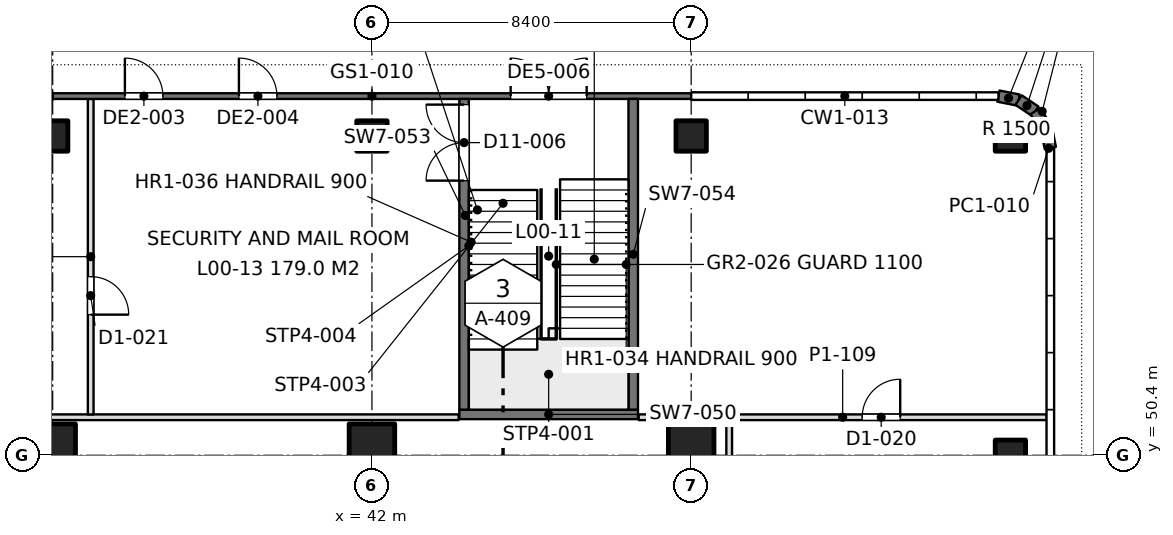
"""IFC4 building model, lengths in metres.
Left out: names, types, materials, properties, quantities, classifications, styles, units other than length and angle.
Written with IfcOpenShell. Run it as: python <this file> out.ifc"""

import sys

from ifc_helpers import new_model, si_unit, direction, frame, frame_2d, origin, origin_2d, place, context, subcontext, project, spatial, rectangle, extrude, element, fill, save


model = new_model("IFC4")
c1 = context("Model", 3, precision=1e-05, world=origin(), true_north=direction((0.0, 1.0)))
c2 = subcontext(c1, "Body", "Model", "MODEL_VIEW")
j1 = project(units=[si_unit("LENGTHUNIT", "METRE"), si_unit("PLANEANGLEUNIT", "RADIAN")], contexts=[c1])
p1 = place(None, origin())
s1 = spatial("IfcSite", under=j1, at=p1, CompositionType="ELEMENT")
p2 = place(p1, origin())
s2 = spatial("IfcBuilding", under=s1, at=p2, CompositionType="ELEMENT")
p3 = place(p2, origin())
s3 = spatial("IfcBuildingStorey", under=s2, at=p3, CompositionType="ELEMENT", Elevation=0.0)
p4 = place(p3, frame((33.6, 50.4, 0.0), z_axis=(0.0, 0.0, 1.0), x_axis=(1.0, 0.0, 0.0)))
e1 = element("IfcColumn", 1, at=p4, inside=s3, PredefinedType="COLUMN", context=c2, shape_type="SweptSolid", body=[
    extrude(rectangle(XDim=1.2, YDim=1.65, at=origin_2d()), origin(), (0.0, 0.0, 1.0), 5.4),
])
p5 = place(p3, frame((33.6, 58.8, 0.0), z_axis=(0.0, 0.0, 1.0), x_axis=(1.0, 0.0, 0.0)))
e2 = element("IfcColumn", 2, at=p5, inside=s3, PredefinedType="COLUMN", context=c2, shape_type="SweptSolid", body=[
    extrude(rectangle(XDim=0.8, YDim=0.8, at=origin_2d()), origin(), (0.0, 0.0, 1.0), 5.4),
])
p6 = place(p3, frame((42.0, 50.4, 0.0), z_axis=(0.0, 0.0, 1.0), x_axis=(1.0, 0.0, 0.0)))
e3 = element("IfcColumn", 3, at=p6, inside=s3, PredefinedType="COLUMN", context=c2, shape_type="SweptSolid", body=[
    extrude(rectangle(XDim=1.2, YDim=1.65, at=origin_2d()), origin(), (0.0, 0.0, 1.0), 5.4),
])
p7 = place(p3, frame((42.0, 58.8, 0.0), z_axis=(0.0, 0.0, 1.0), x_axis=(1.0, 0.0, 0.0)))
e4 = element("IfcColumn", 4, at=p7, inside=s3, PredefinedType="COLUMN", context=c2, shape_type="SweptSolid", body=[
    extrude(rectangle(XDim=0.8, YDim=0.8, at=origin_2d()), origin(), (0.0, 0.0, 1.0), 5.4),
])
p8 = place(p3, frame((50.4, 50.4, 0.0), z_axis=(0.0, 0.0, 1.0), x_axis=(1.0, 0.0, 0.0)))
e5 = element("IfcColumn", 5, at=p8, inside=s3, PredefinedType="COLUMN", context=c2, shape_type="SweptSolid", body=[
    extrude(rectangle(XDim=1.2, YDim=1.65, at=origin_2d()), origin(), (0.0, 0.0, 1.0), 5.4),
])
for number, where, z_axis, x_axis in (
    (6, (50.4, 58.8, 0.0), (0.0, 0.0, 1.0), (1.0, 0.0, 0.0)),
    (7, (58.8, 50.4, 0.0), (0.0, 0.0, 1.0), (1.0, 0.0, 0.0)),
    (8, (58.8, 58.8, 0.0), (0.0, 0.0, 1.0), (1.0, 0.0, 0.0)),
):
    element("IfcColumn", number, at=place(p3, frame(where, z_axis=z_axis, x_axis=x_axis)), inside=s3, PredefinedType="COLUMN", context=c2, shape_type="SweptSolid", body=[
        extrude(rectangle(XDim=0.8, YDim=0.8, at=origin_2d()), origin(), (0.0, 0.0, 1.0), 5.4),
    ])
p9 = place(p3, frame((33.6, 59.85, 0.0), z_axis=(0.0, 0.0, 1.0), x_axis=(1.0, 0.0, 0.0)))
e9 = element("IfcWall", 9, at=p9, inside=s3, PredefinedType="SOLIDWALL", context=c2, shape_type="SweptSolid", body=[
    extrude(rectangle(XDim=16.8, YDim=0.15, at=frame_2d((8.4, 0.0))), origin(), (0.0, 0.0, 1.0), 5.2),
])
p10 = place(p9, frame((4.9, 0.0, 0.0)))
e10 = element("IfcOpeningElement", 10, at=p10, cuts=e9, PredefinedType="OPENING", context=c2, shape_type="SweptSolid", body=[
    extrude(rectangle(XDim=1.0, YDim=2.2, at=frame_2d((0.5, 1.1))), frame((0.0, 0.085, 0.0), z_axis=(0.0, -1.0, 0.0), x_axis=(1.0, 0.0, 0.0)), (0.0, 0.0, 1.0), 0.17),
])
p11 = place(p9, frame((1.9, 0.0, 0.0)))
e11 = element("IfcOpeningElement", 11, at=p11, cuts=e9, PredefinedType="OPENING", context=c2, shape_type="SweptSolid", body=[
    extrude(rectangle(XDim=1.0, YDim=2.2, at=frame_2d((0.5, 1.1))), frame((0.0, 0.085, 0.0), z_axis=(0.0, -1.0, 0.0), x_axis=(1.0, 0.0, 0.0)), (0.0, 0.0, 1.0), 0.17),
])
p12 = place(p9, frame((12.05, 0.0, 0.0)))
e12 = element("IfcOpeningElement", 12, at=p12, cuts=e9, PredefinedType="OPENING", context=c2, shape_type="SweptSolid", body=[
    extrude(rectangle(XDim=2.0, YDim=2.4, at=frame_2d((1.0, 1.2))), frame((0.0, 0.085, 0.0), z_axis=(0.0, -1.0, 0.0), x_axis=(1.0, 0.0, 0.0)), (0.0, 0.0, 1.0), 0.17),
])
p13 = place(p3, frame((58.485, 59.85, 0.0), z_axis=(0.0, 0.0, 1.0), x_axis=(0.980702050465, -0.1955082817, 0.0)))
e13 = element("IfcWall", 13, at=p13, inside=s3, PredefinedType="SOLIDWALL", context=c2, shape_type="SweptSolid", body=[
    extrude(rectangle(XDim=0.541, YDim=0.3, at=frame_2d((0.271, 0.0))), origin(), (0.0, 0.0, 1.0), 5.2),
])
for number, where, z_axis, x_axis in (
    (14, (59.015, 59.744, 0.0), (0.0, 0.0, 1.0), (0.832, -0.555, 0.0)),
    (15, (59.453, 59.453, 0.0), (0.0, 0.0, 1.0), (0.555, -0.832, 0.0)),
):
    element("IfcWall", number, at=place(p3, frame(where, z_axis=z_axis, x_axis=x_axis)), inside=s3, PredefinedType="SOLIDWALL", context=c2, shape_type="SweptSolid", body=[
        extrude(rectangle(XDim=0.526, YDim=0.3, at=frame_2d((0.263, 0.0))), origin(), (0.0, 0.0, 1.0), 5.2),
    ])
p14 = place(p3, frame((59.744, 59.015, 0.0), z_axis=(0.0, 0.0, 1.0), x_axis=(0.1955082817, -0.980702050465, 0.0)))
e16 = element("IfcWall", 16, at=p14, inside=s3, PredefinedType="SOLIDWALL", context=c2, shape_type="SweptSolid", body=[
    extrude(rectangle(XDim=0.541, YDim=0.3, at=frame_2d((0.271, 0.0))), origin(), (0.0, 0.0, 1.0), 5.2),
])
p15 = place(p3, frame((6.12, 51.4, 0.0), z_axis=(0.0, 0.0, 1.0), x_axis=(1.0, 0.0, 0.0)))
e17 = element("IfcWall", 17, at=p15, inside=s3, PredefinedType="PARTITIONING", context=c2, shape_type="SweptSolid", body=[
    extrude(rectangle(XDim=38.16, YDim=0.15, at=frame_2d((19.08, 0.0))), origin(), (0.0, 0.0, 1.0), 4.6),
])
p16 = place(p15, frame((13.98, 0.0, 0.0)))
e18 = element("IfcOpeningElement", 18, at=p16, cuts=e17, PredefinedType="OPENING", context=c2, shape_type="SweptSolid", body=[
    extrude(rectangle(XDim=1.8, YDim=2.2, at=frame_2d((0.9, 1.1))), frame((0.0, 0.085, 0.0), z_axis=(0.0, -1.0, 0.0), x_axis=(1.0, 0.0, 0.0)), (0.0, 0.0, 1.0), 0.17),
])
p17 = place(p15, frame((22.38, 0.0, 0.0)))
e19 = element("IfcOpeningElement", 19, at=p17, cuts=e17, PredefinedType="OPENING", context=c2, shape_type="SweptSolid", body=[
    extrude(rectangle(XDim=1.8, YDim=2.2, at=frame_2d((0.9, 1.1))), frame((0.0, 0.085, 0.0), z_axis=(0.0, -1.0, 0.0), x_axis=(1.0, 0.0, 0.0)), (0.0, 0.0, 1.0), 0.17),
])
p18 = place(p3, frame((49.02, 51.4, 0.0), z_axis=(0.0, 0.0, 1.0), x_axis=(1.0, 0.0, 0.0)))
e20 = element("IfcWall", 20, at=p18, inside=s3, PredefinedType="PARTITIONING", context=c2, shape_type="SweptSolid", body=[
    extrude(rectangle(XDim=10.732, YDim=0.15, at=frame_2d((5.366, 0.0))), origin(), (0.0, 0.0, 1.0), 4.6),
])
p19 = place(p18, frame((5.88, 0.0, 0.0)))
e21 = element("IfcOpeningElement", 21, at=p19, cuts=e20, PredefinedType="OPENING", context=c2, shape_type="SweptSolid", body=[
    extrude(rectangle(XDim=1.0, YDim=2.2, at=frame_2d((0.5, 1.1))), frame((0.0, 0.085, 0.0), z_axis=(0.0, -1.0, 0.0), x_axis=(1.0, 0.0, 0.0)), (0.0, 0.0, 1.0), 0.17),
])
p20 = place(p3, frame((51.4, 37.8, 0.0), z_axis=(0.0, 0.0, 1.0), x_axis=(0.0, 1.0, 0.0)))
e22 = element("IfcWall", 22, at=p20, inside=s3, PredefinedType="PARTITIONING", context=c2, shape_type="SweptSolid", body=[
    extrude(rectangle(XDim=13.526, YDim=0.15, at=frame_2d((6.763, 0.0))), origin(), (0.0, 0.0, 1.0), 4.6),
])
p21 = place(p20, frame((7.9, 0.0, 0.0)))
e23 = element("IfcOpeningElement", 23, at=p21, cuts=e22, PredefinedType="OPENING", context=c2, shape_type="SweptSolid", body=[
    extrude(rectangle(XDim=1.0, YDim=2.2, at=frame_2d((0.5, 1.1))), frame((0.0, 0.085, 0.0), z_axis=(0.0, -1.0, 0.0), x_axis=(1.0, 0.0, 0.0)), (0.0, 0.0, 1.0), 0.17),
])
p22 = place(p3, frame((34.6, 51.474, 0.0), z_axis=(0.0, 0.0, 1.0), x_axis=(0.0, 1.0, 0.0)))
e24 = element("IfcWall", 24, at=p22, inside=s3, PredefinedType="PARTITIONING", context=c2, shape_type="SweptSolid", body=[
    extrude(rectangle(XDim=8.302, YDim=0.15, at=frame_2d((4.151, 0.0))), origin(), (0.0, 0.0, 1.0), 4.6),
])
p23 = place(p22, frame((2.626, 0.0, 0.0)))
e25 = element("IfcOpeningElement", 25, at=p23, cuts=e24, PredefinedType="OPENING", context=c2, shape_type="SweptSolid", body=[
    extrude(rectangle(XDim=1.0, YDim=2.2, at=frame_2d((0.5, 1.1))), frame((0.0, 0.085, 0.0), z_axis=(0.0, -1.0, 0.0), x_axis=(1.0, 0.0, 0.0)), (0.0, 0.0, 1.0), 0.17),
])
p24 = place(p3, frame((44.425, 59.776, 0.0), z_axis=(0.0, 0.0, 1.0), x_axis=(0.0, -1.0, 0.0)))
e26 = element("IfcWall", 26, at=p24, inside=s3, PredefinedType="SOLIDWALL", context=c2, shape_type="SweptSolid", body=[
    extrude(rectangle(XDim=8.176, YDim=0.25, at=frame_2d((4.088, 0.0))), origin(), (0.0, 0.0, 1.0), 5.4),
])
p25 = place(p24, frame((0.15, 0.0, 0.0)))
e27 = element("IfcOpeningElement", 27, at=p25, cuts=e26, PredefinedType="OPENING", context=c2, shape_type="SweptSolid", body=[
    extrude(rectangle(XDim=2.0, YDim=2.2, at=frame_2d((1.0, 1.1))), frame((0.0, 0.135, 0.0), z_axis=(0.0, -1.0, 0.0), x_axis=(1.0, 0.0, 0.0)), (0.0, 0.0, 1.0), 0.27),
])
p26 = place(p3, frame((48.875, 59.776, 0.0), z_axis=(0.0, 0.0, 1.0), x_axis=(0.0, -1.0, 0.0)))
e28 = element("IfcWall", 28, at=p26, inside=s3, PredefinedType="SOLIDWALL", context=c2, shape_type="SweptSolid", body=[
    extrude(rectangle(XDim=8.176, YDim=0.25, at=frame_2d((4.088, 0.0))), origin(), (0.0, 0.0, 1.0), 5.4),
])
p27 = place(p3, frame((44.3, 51.475, 0.0), z_axis=(0.0, 0.0, 1.0), x_axis=(1.0, 0.0, 0.0)))
e29 = element("IfcWall", 29, at=p27, inside=s3, PredefinedType="SOLIDWALL", context=c2, shape_type="SweptSolid", body=[
    extrude(rectangle(XDim=4.7, YDim=0.25, at=frame_2d((2.35, 0.0))), origin(), (0.0, 0.0, 1.0), 5.4),
])
p28 = place(p10, origin())
e30 = element("IfcDoor", 30, at=p28, inside=s3, OperationType="SINGLE_SWING_LEFT", PredefinedType="DOOR", context=c2, shape_type="SweptSolid", body=[
    extrude(rectangle(XDim=1.0, YDim=2.2, at=frame_2d((0.5, 1.1))), frame((0.0, 0.025, 0.0), z_axis=(0.0, -1.0, 0.0), x_axis=(1.0, 0.0, 0.0)), (0.0, 0.0, 1.0), 0.05),
])
fill(e10, e30)
p29 = place(p11, origin())
e31 = element("IfcDoor", 31, at=p29, inside=s3, OperationType="SINGLE_SWING_LEFT", PredefinedType="DOOR", context=c2, shape_type="SweptSolid", body=[
    extrude(rectangle(XDim=1.0, YDim=2.2, at=frame_2d((0.5, 1.1))), frame((0.0, 0.025, 0.0), z_axis=(0.0, -1.0, 0.0), x_axis=(1.0, 0.0, 0.0)), (0.0, 0.0, 1.0), 0.05),
])
fill(e11, e31)
p30 = place(p12, origin())
e32 = element("IfcDoor", 32, at=p30, inside=s3, OperationType="DOUBLE_DOOR_SINGLE_SWING", PredefinedType="DOOR", context=c2, shape_type="SweptSolid", body=[
    extrude(rectangle(XDim=2.0, YDim=2.4, at=frame_2d((1.0, 1.2))), frame((0.0, 0.025, 0.0), z_axis=(0.0, -1.0, 0.0), x_axis=(1.0, 0.0, 0.0)), (0.0, 0.0, 1.0), 0.05),
])
fill(e12, e32)
p31 = place(p19, origin())
e33 = element("IfcDoor", 33, at=p31, inside=s3, OperationType="SINGLE_SWING_RIGHT", PredefinedType="DOOR", context=c2, shape_type="SweptSolid", body=[
    extrude(rectangle(XDim=1.0, YDim=2.2, at=frame_2d((0.5, 1.1))), frame((0.0, 0.025, 0.0), z_axis=(0.0, -1.0, 0.0), x_axis=(1.0, 0.0, 0.0)), (0.0, 0.0, 1.0), 0.05),
])
fill(e21, e33)
p32 = place(p23, frame((1.0, 0.0, 0.0), z_axis=(0.0, 0.0, 1.0), x_axis=(-1.0, 0.0, 0.0)))
e34 = element("IfcDoor", 34, at=p32, inside=s3, OperationType="SINGLE_SWING_RIGHT", PredefinedType="DOOR", context=c2, shape_type="SweptSolid", body=[
    extrude(rectangle(XDim=1.0, YDim=2.2, at=frame_2d((0.5, 1.1))), frame((0.0, 0.025, 0.0), z_axis=(0.0, -1.0, 0.0), x_axis=(1.0, 0.0, 0.0)), (0.0, 0.0, 1.0), 0.05),
])
fill(e25, e34)
p33 = place(p25, frame((2.0, 0.0, 0.0), z_axis=(0.0, 0.0, 1.0), x_axis=(-1.0, 0.0, 0.0)))
e35 = element("IfcDoor", 35, at=p33, inside=s3, OperationType="DOUBLE_DOOR_SINGLE_SWING", PredefinedType="DOOR", context=c2, shape_type="SweptSolid", body=[
    extrude(rectangle(XDim=2.0, YDim=2.2, at=frame_2d((1.0, 1.1))), frame((0.0, 0.025, 0.0), z_axis=(0.0, -1.0, 0.0), x_axis=(1.0, 0.0, 0.0)), (0.0, 0.0, 1.0), 0.05),
])
fill(e27, e35)
save(model, sys.argv[1])
